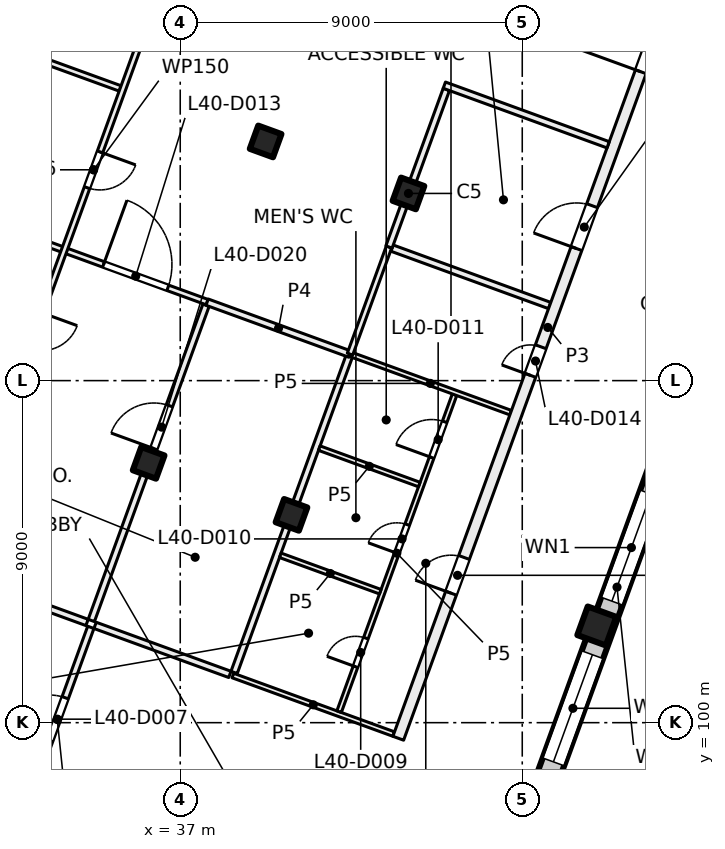
"""IFC4 building model, lengths in metres.
Left out: names, types, materials, properties, quantities, classifications, styles, units other than length and angle.
Written with IfcOpenShell. Run it as: python <this file> out.ifc"""

import sys

from ifc_helpers import new_model, si_unit, direction, frame, frame_2d, origin, origin_2d, place, context, subcontext, project, spatial, rectangle, extrude, element, fill, save


model = new_model("IFC4")
c1 = context("Model", 3, precision=1e-05, world=origin(), true_north=direction((0.0, 1.0)))
c2 = subcontext(c1, "Body", "Model", "MODEL_VIEW")
j1 = project(units=[si_unit("LENGTHUNIT", "METRE"), si_unit("PLANEANGLEUNIT", "RADIAN")], contexts=[c1])
p1 = place(None, origin())
s1 = spatial("IfcSite", under=j1, at=p1, CompositionType="ELEMENT")
p2 = place(p1, origin())
s2 = spatial("IfcBuilding", under=s1, at=p2, CompositionType="ELEMENT")
p3 = place(p2, frame((0.0, 0.0, 170.5)))
s3 = spatial("IfcBuildingStorey", under=s2, at=p3, CompositionType="ELEMENT", Elevation=170.5)
for number, where, z_axis, x_axis in (
    (1, (43.006, 113.925, 0.0), (0.0, 0.0, 1.0), (-0.342, -0.94, 0.0)),
    (2, (39.927, 105.468, 0.0), (0.0, 0.0, 1.0), (-0.342, -0.94, 0.0)),
    (3, (39.247, 115.293, 0.0), (0.0, 0.0, 1.0), (-0.342, -0.94, 0.0)),
    (4, (36.169, 106.836, 0.0), (0.0, 0.0, 1.0), (-0.342, -0.94, 0.0)),
):
    element("IfcColumn", number, at=place(p3, frame(where, z_axis=z_axis, x_axis=x_axis)), inside=s3, PredefinedType="COLUMN", context=c2, shape_type="SweptSolid", body=[
        extrude(rectangle(XDim=0.65, YDim=0.65, at=origin_2d()), origin(), (0.0, 0.0, 1.0), 4.0),
    ])
p4 = place(p3, frame((47.962, 102.544, 0.0), z_axis=(0.0, 0.0, 1.0), x_axis=(-0.342020143326, -0.939692620786, 0.0)))
e5 = element("IfcColumn", 5, at=p4, inside=s3, PredefinedType="COLUMN", context=c2, shape_type="SweptSolid", body=[
    extrude(rectangle(XDim=0.8, YDim=0.8, at=origin_2d()), origin(), (0.0, 0.0, 1.0), 4.0),
])
p5 = place(p3, frame((52.212, 113.783, 0.0), z_axis=(0.0, 0.0, 1.0), x_axis=(-0.34202521188, -0.939690775968, 0.0)))
e6 = element("IfcWall", 6, at=p5, inside=s3, PredefinedType="SOLIDWALL", context=c2, shape_type="SweptSolid", body=[
    extrude(rectangle(XDim=21.745, YDim=0.6, at=frame_2d((10.873, 0.0))), origin(), (0.0, 0.0, 1.0), 3.625),
])
p6 = place(p5, frame((3.765, 0.0, 0.9)))
e7 = element("IfcOpeningElement", 7, at=p6, cuts=e6, PredefinedType="OPENING", context=c2, shape_type="SweptSolid", body=[
    extrude(rectangle(XDim=3.0, YDim=2.4, at=frame_2d((1.5, 1.2))), frame((0.0, 0.31, 0.0), z_axis=(0.0, -1.0, 0.0), x_axis=(1.0, 0.0, 0.0)), (0.0, 0.0, 1.0), 0.62),
])
p7 = place(p5, frame((8.265, 0.0, 0.9)))
e8 = element("IfcOpeningElement", 8, at=p7, cuts=e6, PredefinedType="OPENING", context=c2, shape_type="SweptSolid", body=[
    extrude(rectangle(XDim=3.0, YDim=2.4, at=frame_2d((1.5, 1.2))), frame((0.0, 0.31, 0.0), z_axis=(0.0, -1.0, 0.0), x_axis=(1.0, 0.0, 0.0)), (0.0, 0.0, 1.0), 0.62),
])
p8 = place(p5, frame((12.765, 0.0, 0.9)))
e9 = element("IfcOpeningElement", 9, at=p8, cuts=e6, PredefinedType="OPENING", context=c2, shape_type="SweptSolid", body=[
    extrude(rectangle(XDim=3.0, YDim=2.4, at=frame_2d((1.5, 1.2))), frame((0.0, 0.31, 0.0), z_axis=(0.0, -1.0, 0.0), x_axis=(1.0, 0.0, 0.0)), (0.0, 0.0, 1.0), 0.62),
])
p9 = place(p5, frame((17.265, 0.0, 0.9)))
e10 = element("IfcOpeningElement", 10, at=p9, cuts=e6, PredefinedType="OPENING", context=c2, shape_type="SweptSolid", body=[
    extrude(rectangle(XDim=3.0, YDim=2.4, at=frame_2d((1.5, 1.2))), frame((0.0, 0.31, 0.0), z_axis=(0.0, -1.0, 0.0), x_axis=(1.0, 0.0, 0.0)), (0.0, 0.0, 1.0), 0.62),
])
p10 = place(p3, frame((24.666, 100.669, 0.0), z_axis=(0.0, 0.0, 1.0), x_axis=(0.34201964167, 0.939692803373, 0.0)))
e11 = element("IfcWall", 11, at=p10, inside=s3, PredefinedType="SOLIDWALL", context=c2, shape_type="SweptSolid", body=[
    extrude(rectangle(XDim=32.884, YDim=0.6, at=frame_2d((16.442, 0.0))), origin(), (0.0, 0.0, 1.0), 3.625),
])
p11 = place(p10, frame((1.48, 0.0, 0.9)))
e12 = element("IfcOpeningElement", 12, at=p11, cuts=e11, PredefinedType="OPENING", context=c2, shape_type="SweptSolid", body=[
    extrude(rectangle(XDim=3.0, YDim=2.4, at=frame_2d((1.5, 1.2))), frame((0.0, 0.31, 0.0), z_axis=(0.0, -1.0, 0.0), x_axis=(1.0, 0.0, 0.0)), (0.0, 0.0, 1.0), 0.62),
])
p12 = place(p10, frame((5.98, 0.0, 0.9)))
e13 = element("IfcOpeningElement", 13, at=p12, cuts=e11, PredefinedType="OPENING", context=c2, shape_type="SweptSolid", body=[
    extrude(rectangle(XDim=3.0, YDim=2.4, at=frame_2d((1.5, 1.2))), frame((0.0, 0.31, 0.0), z_axis=(0.0, -1.0, 0.0), x_axis=(1.0, 0.0, 0.0)), (0.0, 0.0, 1.0), 0.62),
])
p13 = place(p10, frame((10.48, 0.0, 0.9)))
e14 = element("IfcOpeningElement", 14, at=p13, cuts=e11, PredefinedType="OPENING", context=c2, shape_type="SweptSolid", body=[
    extrude(rectangle(XDim=3.0, YDim=2.4, at=frame_2d((1.5, 1.2))), frame((0.0, 0.31, 0.0), z_axis=(0.0, -1.0, 0.0), x_axis=(1.0, 0.0, 0.0)), (0.0, 0.0, 1.0), 0.62),
])
p14 = place(p10, frame((14.98, 0.0, 0.9)))
e15 = element("IfcOpeningElement", 15, at=p14, cuts=e11, PredefinedType="OPENING", context=c2, shape_type="SweptSolid", body=[
    extrude(rectangle(XDim=3.0, YDim=2.4, at=frame_2d((1.5, 1.2))), frame((0.0, 0.31, 0.0), z_axis=(0.0, -1.0, 0.0), x_axis=(1.0, 0.0, 0.0)), (0.0, 0.0, 1.0), 0.62),
])
p15 = place(p10, frame((19.48, 0.0, 0.9)))
e16 = element("IfcOpeningElement", 16, at=p15, cuts=e11, PredefinedType="OPENING", context=c2, shape_type="SweptSolid", body=[
    extrude(rectangle(XDim=3.0, YDim=2.4, at=frame_2d((1.5, 1.2))), frame((0.0, 0.31, 0.0), z_axis=(0.0, -1.0, 0.0), x_axis=(1.0, 0.0, 0.0)), (0.0, 0.0, 1.0), 0.62),
])
p16 = place(p10, frame((23.98, 0.0, 0.9)))
e17 = element("IfcOpeningElement", 17, at=p16, cuts=e11, PredefinedType="OPENING", context=c2, shape_type="SweptSolid", body=[
    extrude(rectangle(XDim=3.0, YDim=2.4, at=frame_2d((1.5, 1.2))), frame((0.0, 0.31, 0.0), z_axis=(0.0, -1.0, 0.0), x_axis=(1.0, 0.0, 0.0)), (0.0, 0.0, 1.0), 0.62),
])
p17 = place(p10, frame((28.48, 0.0, 0.9)))
e18 = element("IfcOpeningElement", 18, at=p17, cuts=e11, PredefinedType="OPENING", context=c2, shape_type="SweptSolid", body=[
    extrude(rectangle(XDim=3.0, YDim=2.4, at=frame_2d((1.5, 1.2))), frame((0.0, 0.31, 0.0), z_axis=(0.0, -1.0, 0.0), x_axis=(1.0, 0.0, 0.0)), (0.0, 0.0, 1.0), 0.62),
])
p18 = place(p3, frame((26.736, 105.48, 0.0), z_axis=(0.0, 0.0, 1.0), x_axis=(0.939705074886, -0.341985924028, 0.0)))
e19 = element("IfcWall", 19, at=p18, inside=s3, PredefinedType="PARTITIONING", context=c2, shape_type="SweptSolid", body=[
    extrude(rectangle(XDim=8.313, YDim=0.175, at=frame_2d((4.157, 0.0))), origin(), (0.0, 0.0, 1.0), 3.625),
])
p19 = place(p3, frame((29.814, 113.938, 0.0), z_axis=(0.0, 0.0, 1.0), x_axis=(0.939698351515, -0.342004397867, 0.0)))
e20 = element("IfcWall", 20, at=p19, inside=s3, PredefinedType="PARTITIONING", context=c2, shape_type="SweptSolid", body=[
    extrude(rectangle(XDim=8.401, YDim=0.15, at=frame_2d((4.2, 0.0))), origin(), (0.0, 0.0, 1.0), 3.625),
])
p20 = place(p19, frame((5.5, 0.0, 0.0)))
e21 = element("IfcOpeningElement", 21, at=p20, cuts=e20, PredefinedType="OPENING", context=c2, shape_type="SweptSolid", body=[
    extrude(rectangle(XDim=1.8, YDim=2.1, at=frame_2d((0.9, 1.05))), frame((0.0, 0.085, 0.0), z_axis=(0.0, -1.0, 0.0), x_axis=(1.0, 0.0, 0.0)), (0.0, 0.0, 1.0), 0.17),
])
p21 = place(p3, frame((31.353, 118.166, 0.0), z_axis=(0.0, 0.0, 1.0), x_axis=(0.939803311208, -0.341715870634, 0.0)))
e22 = element("IfcWall", 22, at=p21, inside=s3, PredefinedType="PARTITIONING", context=c2, shape_type="SweptSolid", body=[
    extrude(rectangle(XDim=4.325, YDim=0.15, at=frame_2d((2.163, 0.0))), origin(), (0.0, 0.0, 1.0), 3.625),
])
p22 = place(p3, frame((37.053, 120.96, 0.0), z_axis=(0.0, 0.0, 1.0), x_axis=(-0.342064742067, -0.939676386973, 0.0)))
e23 = element("IfcWall", 23, at=p22, inside=s3, PredefinedType="PARTITIONING", context=c2, shape_type="SweptSolid", body=[
    extrude(rectangle(XDim=13.649, YDim=0.15, at=frame_2d((6.825, 0.0))), origin(), (0.0, 0.0, 1.0), 3.625),
])
p23 = place(p22, frame((10.824, 0.0, 0.0)))
e24 = element("IfcOpeningElement", 24, at=p23, cuts=e23, PredefinedType="OPENING", context=c2, shape_type="SweptSolid", body=[
    extrude(rectangle(XDim=1.0, YDim=2.1, at=frame_2d((0.5, 1.05))), frame((0.0, 0.085, 0.0), z_axis=(0.0, -1.0, 0.0), x_axis=(1.0, 0.0, 0.0)), (0.0, 0.0, 1.0), 0.17),
])
p24 = place(p22, frame((6.324, 0.0, 0.0)))
e25 = element("IfcOpeningElement", 25, at=p24, cuts=e23, PredefinedType="OPENING", context=c2, shape_type="SweptSolid", body=[
    extrude(rectangle(XDim=1.0, YDim=2.1, at=frame_2d((0.5, 1.05))), frame((0.0, 0.085, 0.0), z_axis=(0.0, -1.0, 0.0), x_axis=(1.0, 0.0, 0.0)), (0.0, 0.0, 1.0), 0.17),
])
p25 = place(p22, frame((1.824, 0.0, 0.0)))
e26 = element("IfcOpeningElement", 26, at=p25, cuts=e23, PredefinedType="OPENING", context=c2, shape_type="SweptSolid", body=[
    extrude(rectangle(XDim=1.0, YDim=2.1, at=frame_2d((0.5, 1.05))), frame((0.0, 0.085, 0.0), z_axis=(0.0, -1.0, 0.0), x_axis=(1.0, 0.0, 0.0)), (0.0, 0.0, 1.0), 0.17),
])
p26 = place(p3, frame((32.881, 97.657, 0.0), z_axis=(0.0, 0.0, 1.0), x_axis=(0.342058204353, 0.939678766832, 0.0)))
e27 = element("IfcWall", 27, at=p26, inside=s3, PredefinedType="PARTITIONING", context=c2, shape_type="SweptSolid", body=[
    extrude(rectangle(XDim=5.163, YDim=0.175, at=frame_2d((2.581, 0.0))), origin(), (0.0, 0.0, 1.0), 3.625),
])
p27 = place(p26, frame((1.991, 0.0, 0.0)))
e28 = element("IfcOpeningElement", 28, at=p27, cuts=e27, PredefinedType="OPENING", context=c2, shape_type="SweptSolid", body=[
    extrude(rectangle(XDim=1.2, YDim=2.1, at=frame_2d((0.6, 1.05))), frame((0.0, 0.097, 0.0), z_axis=(0.0, -1.0, 0.0), x_axis=(1.0, 0.0, 0.0)), (0.0, 0.0, 1.0), 0.195),
])
p28 = place(p3, frame((34.759, 102.56, 0.0), z_axis=(0.0, 0.0, 1.0), x_axis=(0.939770757411, -0.341805388365, 0.0)))
e29 = element("IfcWall", 29, at=p28, inside=s3, PredefinedType="PARTITIONING", context=c2, shape_type="SweptSolid", body=[
    extrude(rectangle(XDim=3.774, YDim=0.175, at=frame_2d((1.887, 0.0))), origin(), (0.0, 0.0, 1.0), 3.625),
])
p29 = place(p3, frame((34.66, 102.689, 0.0), z_axis=(0.0, 0.0, 1.0), x_axis=(0.341951828534, 0.939717482524, 0.0)))
e30 = element("IfcWall", 30, at=p29, inside=s3, PredefinedType="PARTITIONING", context=c2, shape_type="SweptSolid", body=[
    extrude(rectangle(XDim=8.826, YDim=0.175, at=frame_2d((4.413, 0.0))), origin(), (0.0, 0.0, 1.0), 3.625),
])
p30 = place(p29, frame((4.813, 0.0, 0.0)))
e31 = element("IfcOpeningElement", 31, at=p30, cuts=e30, PredefinedType="OPENING", context=c2, shape_type="SweptSolid", body=[
    extrude(rectangle(XDim=1.2, YDim=2.1, at=frame_2d((0.6, 1.05))), frame((0.0, 0.097, 0.0), z_axis=(0.0, -1.0, 0.0), x_axis=(1.0, 0.0, 0.0)), (0.0, 0.0, 1.0), 0.195),
])
p31 = place(p3, frame((38.385, 101.24, 0.0), z_axis=(0.0, 0.0, 1.0), x_axis=(0.939711088937, -0.341969398235, 0.0)))
e32 = element("IfcWall", 32, at=p31, inside=s3, PredefinedType="PARTITIONING", context=c2, shape_type="SweptSolid", body=[
    extrude(rectangle(XDim=4.503, YDim=0.125, at=frame_2d((2.252, 0.0))), origin(), (0.0, 0.0, 1.0), 3.625),
])
p32 = place(p3, frame((38.418, 101.322, 0.0), z_axis=(0.0, 0.0, 1.0), x_axis=(0.342101536507, 0.939662992099, 0.0)))
e33 = element("IfcWall", 33, at=p32, inside=s3, PredefinedType="PARTITIONING", context=c2, shape_type="SweptSolid", body=[
    extrude(rectangle(XDim=8.913, YDim=0.175, at=frame_2d((4.457, 0.0))), origin(), (0.0, 0.0, 1.0), 3.625),
])
p33 = place(p3, frame((41.181, 100.29, 0.0), z_axis=(0.0, 0.0, 1.0), x_axis=(0.34222012082, 0.939619810831, 0.0)))
e34 = element("IfcWall", 34, at=p33, inside=s3, PredefinedType="PARTITIONING", context=c2, shape_type="SweptSolid", body=[
    extrude(rectangle(XDim=8.875, YDim=0.125, at=frame_2d((4.438, 0.0))), origin(), (0.0, 0.0, 1.0), 3.625),
])
p34 = place(p33, frame((1.258, 0.0, 0.0)))
e35 = element("IfcOpeningElement", 35, at=p34, cuts=e34, PredefinedType="OPENING", context=c2, shape_type="SweptSolid", body=[
    extrude(rectangle(XDim=0.8, YDim=2.1, at=frame_2d((0.4, 1.05))), frame((0.0, 0.073, 0.0), z_axis=(0.0, -1.0, 0.0), x_axis=(1.0, 0.0, 0.0)), (0.0, 0.0, 1.0), 0.145),
])
p35 = place(p33, frame((4.437, 0.0, 0.0)))
e36 = element("IfcOpeningElement", 36, at=p35, cuts=e34, PredefinedType="OPENING", context=c2, shape_type="SweptSolid", body=[
    extrude(rectangle(XDim=0.8, YDim=2.1, at=frame_2d((0.4, 1.05))), frame((0.0, 0.073, 0.0), z_axis=(0.0, -1.0, 0.0), x_axis=(1.0, 0.0, 0.0)), (0.0, 0.0, 1.0), 0.145),
])
p36 = place(p33, frame((7.116, 0.0, 0.0)))
e37 = element("IfcOpeningElement", 37, at=p36, cuts=e34, PredefinedType="OPENING", context=c2, shape_type="SweptSolid", body=[
    extrude(rectangle(XDim=1.0, YDim=2.1, at=frame_2d((0.5, 1.05))), frame((0.0, 0.073, 0.0), z_axis=(0.0, -1.0, 0.0), x_axis=(1.0, 0.0, 0.0)), (0.0, 0.0, 1.0), 0.145),
])
p37 = place(p3, frame((41.467, 109.697, 0.0), z_axis=(0.0, 0.0, 1.0), x_axis=(-0.939713209288, 0.341963571582, 0.0)))
e38 = element("IfcWall", 38, at=p37, inside=s3, PredefinedType="PARTITIONING", context=c2, shape_type="SweptSolid", body=[
    extrude(rectangle(XDim=4.0, YDim=0.175, at=frame_2d((2.0, 0.0))), origin(), (0.0, 0.0, 1.0), 3.625),
])
p38 = place(p3, frame((41.467, 109.697, 0.0), z_axis=(0.0, 0.0, 1.0), x_axis=(0.939609529273, -0.342248349154, 0.0)))
e39 = element("IfcWall", 39, at=p38, inside=s3, PredefinedType="PARTITIONING", context=c2, shape_type="SweptSolid", body=[
    extrude(rectangle(XDim=4.5, YDim=0.125, at=frame_2d((2.25, 0.0))), origin(), (0.0, 0.0, 1.0), 3.625),
])
p39 = place(p3, frame((42.264, 103.446, 0.0), z_axis=(0.0, 0.0, 1.0), x_axis=(-0.939640574808, 0.342163104635, 0.0)))
e40 = element("IfcWall", 40, at=p39, inside=s3, PredefinedType="PARTITIONING", context=c2, shape_type="SweptSolid", body=[
    extrude(rectangle(XDim=2.8, YDim=0.125, at=frame_2d((1.4, 0.0))), origin(), (0.0, 0.0, 1.0), 3.625),
])
p40 = place(p3, frame((42.493, 112.516, 0.0), z_axis=(0.0, 0.0, 1.0), x_axis=(-0.341965219194, -0.939712609717, 0.0)))
e41 = element("IfcWall", 41, at=p40, inside=s3, PredefinedType="PARTITIONING", context=c2, shape_type="SweptSolid", body=[
    extrude(rectangle(XDim=3.0, YDim=0.15, at=frame_2d((1.5, 0.0))), origin(), (0.0, 0.0, 1.0), 3.625),
])
p41 = place(p3, frame((42.575, 112.486, 0.0), z_axis=(0.0, 0.0, 1.0), x_axis=(0.939620446327, -0.342218375959, 0.0)))
e42 = element("IfcWall", 42, at=p41, inside=s3, PredefinedType="PARTITIONING", context=c2, shape_type="SweptSolid", body=[
    extrude(rectangle(XDim=4.412, YDim=0.175, at=frame_2d((2.206, 0.0))), origin(), (0.0, 0.0, 1.0), 3.625),
])
p42 = place(p3, frame((42.737, 99.59, 0.0), z_axis=(0.0, 0.0, 1.0), x_axis=(0.341992703977, 0.939702607438, 0.0)))
e43 = element("IfcWall", 43, at=p42, inside=s3, PredefinedType="PARTITIONING", context=c2, shape_type="SweptSolid", body=[
    extrude(rectangle(XDim=23.006, YDim=0.3, at=frame_2d((11.503, 0.0))), origin(), (0.0, 0.0, 1.0), 3.625),
])
p43 = place(p42, frame((4.062, 0.0, 0.0)))
e44 = element("IfcOpeningElement", 44, at=p43, cuts=e43, PredefinedType="OPENING", context=c2, shape_type="SweptSolid", body=[
    extrude(rectangle(XDim=1.0, YDim=2.1, at=frame_2d((0.5, 1.05))), frame((0.0, 0.16, 0.0), z_axis=(0.0, -1.0, 0.0), x_axis=(1.0, 0.0, 0.0)), (0.0, 0.0, 1.0), 0.32),
])
p44 = place(p42, frame((10.162, 0.0, 0.0)))
e45 = element("IfcOpeningElement", 45, at=p44, cuts=e43, PredefinedType="OPENING", context=c2, shape_type="SweptSolid", body=[
    extrude(rectangle(XDim=0.8, YDim=2.1, at=frame_2d((0.4, 1.05))), frame((0.0, 0.16, 0.0), z_axis=(0.0, -1.0, 0.0), x_axis=(1.0, 0.0, 0.0)), (0.0, 0.0, 1.0), 0.32),
])
p45 = place(p42, frame((13.712, 0.0, 0.0)))
e46 = element("IfcOpeningElement", 46, at=p45, cuts=e43, PredefinedType="OPENING", context=c2, shape_type="SweptSolid", body=[
    extrude(rectangle(XDim=1.2, YDim=2.1, at=frame_2d((0.6, 1.05))), frame((0.0, 0.16, 0.0), z_axis=(0.0, -1.0, 0.0), x_axis=(1.0, 0.0, 0.0)), (0.0, 0.0, 1.0), 0.32),
])
p46 = place(p42, frame((18.662, 0.0, 0.0)))
e47 = element("IfcOpeningElement", 47, at=p46, cuts=e43, PredefinedType="OPENING", context=c2, shape_type="SweptSolid", body=[
    extrude(rectangle(XDim=1.8, YDim=2.1, at=frame_2d((0.9, 1.05))), frame((0.0, 0.16, 0.0), z_axis=(0.0, -1.0, 0.0), x_axis=(1.0, 0.0, 0.0)), (0.0, 0.0, 1.0), 0.32),
])
p47 = place(p3, frame((43.29, 106.266, 0.0), z_axis=(0.0, 0.0, 1.0), x_axis=(-0.939650782256, 0.342135071873, 0.0)))
e48 = element("IfcWall", 48, at=p47, inside=s3, PredefinedType="PARTITIONING", context=c2, shape_type="SweptSolid", body=[
    extrude(rectangle(XDim=2.8, YDim=0.125, at=frame_2d((1.4, 0.0))), origin(), (0.0, 0.0, 1.0), 3.625),
])
p48 = place(p3, frame((44.002, 116.662, 0.0), z_axis=(0.0, 0.0, 1.0), x_axis=(-0.342022951975, -0.939691598517, 0.0)))
e49 = element("IfcWall", 49, at=p48, inside=s3, PredefinedType="PARTITIONING", context=c2, shape_type="SweptSolid", body=[
    extrude(rectangle(XDim=4.412, YDim=0.175, at=frame_2d((2.206, 0.0))), origin(), (0.0, 0.0, 1.0), 3.625),
])
p49 = place(p3, frame((48.26, 115.205, 0.0), z_axis=(0.0, 0.0, 1.0), x_axis=(-0.939684589011, 0.34204220964, 0.0)))
e50 = element("IfcWall", 50, at=p49, inside=s3, PredefinedType="PARTITIONING", context=c2, shape_type="SweptSolid", body=[
    extrude(rectangle(XDim=4.587, YDim=0.175, at=frame_2d((2.293, 0.0))), origin(), (0.0, 0.0, 1.0), 3.625),
])
p50 = place(p7, origin())
e51 = element("IfcWindow", 51, at=p50, inside=s3, PartitioningType="SINGLE_PANEL", PredefinedType="WINDOW", context=c2, shape_type="SweptSolid", body=[
    extrude(rectangle(XDim=3.0, YDim=2.4, at=frame_2d((1.5, 1.2))), frame((0.0, 0.03, 0.0), z_axis=(0.0, -1.0, 0.0), x_axis=(1.0, 0.0, 0.0)), (0.0, 0.0, 1.0), 0.06),
])
fill(e8, e51)
p51 = place(p8, origin())
e52 = element("IfcWindow", 52, at=p51, inside=s3, PartitioningType="SINGLE_PANEL", PredefinedType="WINDOW", context=c2, shape_type="SweptSolid", body=[
    extrude(rectangle(XDim=3.0, YDim=2.4, at=frame_2d((1.5, 1.2))), frame((0.0, 0.03, 0.0), z_axis=(0.0, -1.0, 0.0), x_axis=(1.0, 0.0, 0.0)), (0.0, 0.0, 1.0), 0.06),
])
fill(e9, e52)
p52 = place(p27, origin())
e53 = element("IfcDoor", 53, at=p52, inside=s3, OperationType="DOUBLE_DOOR_SINGLE_SWING", PredefinedType="DOOR", context=c2, shape_type="SweptSolid", body=[
    extrude(rectangle(XDim=1.2, YDim=2.1, at=frame_2d((0.6, 1.05))), frame((0.0, 0.025, 0.0), z_axis=(0.0, -1.0, 0.0), x_axis=(1.0, 0.0, 0.0)), (0.0, 0.0, 1.0), 0.05),
])
fill(e28, e53)
p53 = place(p43, origin())
e54 = element("IfcDoor", 54, at=p53, inside=s3, OperationType="SINGLE_SWING_LEFT", PredefinedType="DOOR", context=c2, shape_type="SweptSolid", body=[
    extrude(rectangle(XDim=1.0, YDim=2.1, at=frame_2d((0.5, 1.05))), frame((0.0, 0.025, 0.0), z_axis=(0.0, -1.0, 0.0), x_axis=(1.0, 0.0, 0.0)), (0.0, 0.0, 1.0), 0.05),
])
fill(e44, e54)
p54 = place(p34, origin())
e55 = element("IfcDoor", 55, at=p54, inside=s3, OperationType="SINGLE_SWING_LEFT", PredefinedType="DOOR", context=c2, shape_type="SweptSolid", body=[
    extrude(rectangle(XDim=0.8, YDim=2.1, at=frame_2d((0.4, 1.05))), frame((0.0, 0.025, 0.0), z_axis=(0.0, -1.0, 0.0), x_axis=(1.0, 0.0, 0.0)), (0.0, 0.0, 1.0), 0.05),
])
fill(e35, e55)
p55 = place(p35, origin())
e56 = element("IfcDoor", 56, at=p55, inside=s3, OperationType="SINGLE_SWING_LEFT", PredefinedType="DOOR", context=c2, shape_type="SweptSolid", body=[
    extrude(rectangle(XDim=0.8, YDim=2.1, at=frame_2d((0.4, 1.05))), frame((0.0, 0.025, 0.0), z_axis=(0.0, -1.0, 0.0), x_axis=(1.0, 0.0, 0.0)), (0.0, 0.0, 1.0), 0.05),
])
fill(e36, e56)
p56 = place(p36, origin())
e57 = element("IfcDoor", 57, at=p56, inside=s3, OperationType="SINGLE_SWING_LEFT", PredefinedType="DOOR", context=c2, shape_type="SweptSolid", body=[
    extrude(rectangle(XDim=1.0, YDim=2.1, at=frame_2d((0.5, 1.05))), frame((0.0, 0.025, 0.0), z_axis=(0.0, -1.0, 0.0), x_axis=(1.0, 0.0, 0.0)), (0.0, 0.0, 1.0), 0.05),
])
fill(e37, e57)
p57 = place(p20, origin())
e58 = element("IfcDoor", 58, at=p57, inside=s3, OperationType="DOUBLE_DOOR_SINGLE_SWING", PredefinedType="DOOR", context=c2, shape_type="SweptSolid", body=[
    extrude(rectangle(XDim=1.8, YDim=2.1, at=frame_2d((0.9, 1.05))), frame((0.0, 0.025, 0.0), z_axis=(0.0, -1.0, 0.0), x_axis=(1.0, 0.0, 0.0)), (0.0, 0.0, 1.0), 0.05),
])
fill(e21, e58)
p58 = place(p44, origin())
e59 = element("IfcDoor", 59, at=p58, inside=s3, OperationType="SINGLE_SWING_RIGHT", PredefinedType="DOOR", context=c2, shape_type="SweptSolid", body=[
    extrude(rectangle(XDim=0.8, YDim=2.1, at=frame_2d((0.4, 1.05))), frame((0.0, 0.025, 0.0), z_axis=(0.0, -1.0, 0.0), x_axis=(1.0, 0.0, 0.0)), (0.0, 0.0, 1.0), 0.05),
])
fill(e45, e59)
p59 = place(p45, origin())
e60 = element("IfcDoor", 60, at=p59, inside=s3, OperationType="DOUBLE_DOOR_SINGLE_SWING", PredefinedType="DOOR", context=c2, shape_type="SweptSolid", body=[
    extrude(rectangle(XDim=1.2, YDim=2.1, at=frame_2d((0.6, 1.05))), frame((0.0, 0.025, 0.0), z_axis=(0.0, -1.0, 0.0), x_axis=(1.0, 0.0, 0.0)), (0.0, 0.0, 1.0), 0.05),
])
fill(e46, e60)
p60 = place(p24, origin())
e61 = element("IfcDoor", 61, at=p60, inside=s3, OperationType="SINGLE_SWING_RIGHT", PredefinedType="DOOR", context=c2, shape_type="SweptSolid", body=[
    extrude(rectangle(XDim=1.0, YDim=2.1, at=frame_2d((0.5, 1.05))), frame((0.0, 0.025, 0.0), z_axis=(0.0, -1.0, 0.0), x_axis=(1.0, 0.0, 0.0)), (0.0, 0.0, 1.0), 0.05),
])
fill(e25, e61)
p61 = place(p46, origin())
e62 = element("IfcDoor", 62, at=p61, inside=s3, OperationType="DOUBLE_DOOR_SINGLE_SWING", PredefinedType="DOOR", context=c2, shape_type="SweptSolid", body=[
    extrude(rectangle(XDim=1.8, YDim=2.1, at=frame_2d((0.9, 1.05))), frame((0.0, 0.025, 0.0), z_axis=(0.0, -1.0, 0.0), x_axis=(1.0, 0.0, 0.0)), (0.0, 0.0, 1.0), 0.05),
])
fill(e47, e62)
p62 = place(p30, origin())
e63 = element("IfcDoor", 63, at=p62, inside=s3, OperationType="DOUBLE_DOOR_SINGLE_SWING", PredefinedType="DOOR", context=c2, shape_type="SweptSolid", body=[
    extrude(rectangle(XDim=1.2, YDim=2.1, at=frame_2d((0.6, 1.05))), frame((0.0, 0.025, 0.0), z_axis=(0.0, -1.0, 0.0), x_axis=(1.0, 0.0, 0.0)), (0.0, 0.0, 1.0), 0.05),
])
fill(e31, e63)
save(model, sys.argv[1])
